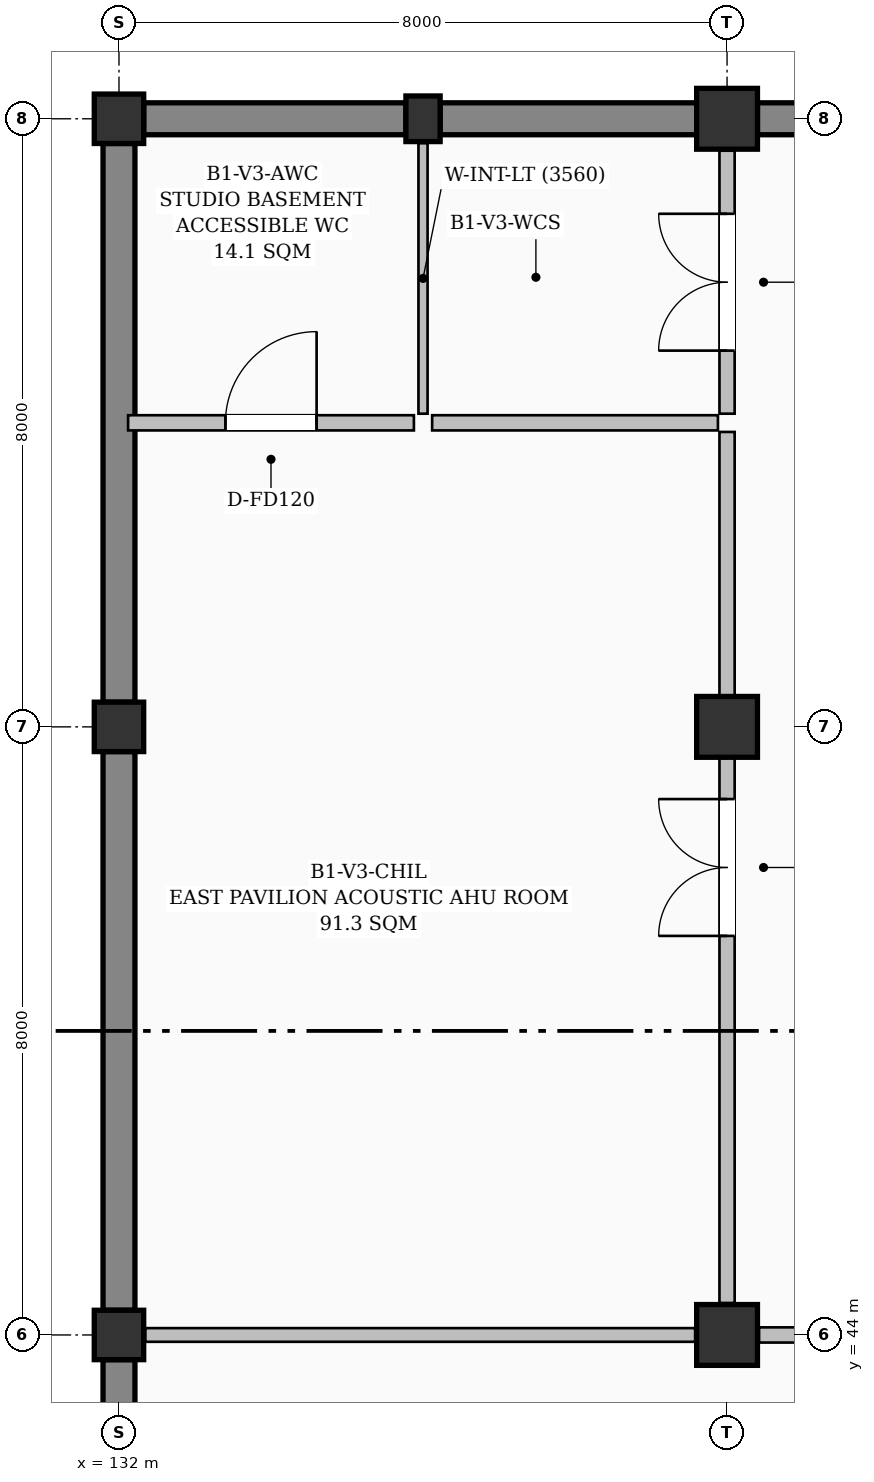
"""IFC4 building model, lengths in metres.
Left out: names, types, materials, properties, quantities, classifications, styles, units other than length and angle.
Written with IfcOpenShell. Run it as: python <this file> out.ifc"""

import sys

from ifc_helpers import new_model, si_unit, direction, frame, frame_2d, origin, origin_2d, place, context, subcontext, project, spatial, rectangle, extrude, element, fill, save


model = new_model("IFC4")
c1 = context("Model", 3, precision=1e-05, world=origin(), true_north=direction((0.0, 1.0)))
c2 = subcontext(c1, "Body", "Model", "MODEL_VIEW")
j1 = project(units=[si_unit("LENGTHUNIT", "METRE"), si_unit("PLANEANGLEUNIT", "RADIAN")], contexts=[c1])
p1 = place(None, origin())
s1 = spatial("IfcSite", under=j1, at=p1, CompositionType="ELEMENT")
p2 = place(p1, origin())
s2 = spatial("IfcBuilding", under=s1, at=p2, CompositionType="ELEMENT")
p3 = place(p2, frame((0.0, 0.0, -4.8)))
s3 = spatial("IfcBuildingStorey", under=s2, at=p3, CompositionType="ELEMENT", Elevation=-4.8)
for number, where, z_axis, x_axis in (
    (1, (132.0, 44.0, -0.38), (0.0, 0.0, 1.0), (1.0, 0.0, 0.0)),
    (2, (132.0, 52.0, -0.38), (0.0, 0.0, 1.0), (1.0, 0.0, 0.0)),
    (3, (132.0, 60.0, -0.38), (0.0, 0.0, 1.0), (1.0, 0.0, 0.0)),
):
    element("IfcColumn", number, at=place(p3, frame(where, z_axis=z_axis, x_axis=x_axis)), inside=s3, PredefinedType="COLUMN", context=c2, shape_type="SweptSolid", body=[
        extrude(rectangle(XDim=0.65, YDim=0.65, at=origin_2d()), origin(), (0.0, 0.0, 1.0), 5.18),
    ])
p4 = place(p3, frame((136.0, 60.0, -0.38), z_axis=(0.0, 0.0, 1.0), x_axis=(1.0, 0.0, 0.0)))
e4 = element("IfcColumn", 4, at=p4, inside=s3, PredefinedType="PILASTER", context=c2, shape_type="SweptSolid", body=[
    extrude(rectangle(XDim=0.45, YDim=0.6, at=origin_2d()), origin(), (0.0, 0.0, 1.0), 5.18),
])
for number, where, z_axis, x_axis in (
    (5, (140.0, 44.0, -0.38), (0.0, 0.0, 1.0), (1.0, 0.0, 0.0)),
    (6, (140.0, 52.0, -0.38), (0.0, 0.0, 1.0), (1.0, 0.0, 0.0)),
    (7, (140.0, 60.0, -0.38), (0.0, 0.0, 1.0), (1.0, 0.0, 0.0)),
):
    element("IfcColumn", number, at=place(p3, frame(where, z_axis=z_axis, x_axis=x_axis)), inside=s3, PredefinedType="COLUMN", context=c2, shape_type="SweptSolid", body=[
        extrude(rectangle(XDim=0.8, YDim=0.8, at=origin_2d()), origin(), (0.0, 0.0, 1.0), 5.18),
    ])
for number, where, z_axis, x_axis in (
    (8, (132.0, 36.325, 0.0), (0.0, 0.0, 1.0), (0.0, 1.0, 0.0)),
    (9, (132.0, 44.325, 0.0), (0.0, 0.0, 1.0), (0.0, 1.0, 0.0)),
    (10, (132.0, 52.325, 0.0), (0.0, 0.0, 1.0), (0.0, 1.0, 0.0)),
):
    element("IfcWall", number, at=place(p3, frame(where, z_axis=z_axis, x_axis=x_axis)), inside=s3, PredefinedType="USERDEFINED", context=c2, shape_type="SweptSolid", body=[
        extrude(rectangle(XDim=7.35, YDim=0.42, at=frame_2d((3.675, 0.0))), origin(), (0.0, 0.0, 1.0), 3.85),
    ])
p5 = place(p3, frame((132.325, 60.0, 0.0), z_axis=(0.0, 0.0, 1.0), x_axis=(1.0, 0.0, 0.0)))
e11 = element("IfcWall", 11, at=p5, inside=s3, PredefinedType="USERDEFINED", context=c2, shape_type="SweptSolid", body=[
    extrude(rectangle(XDim=3.45, YDim=0.42, at=frame_2d((1.725, 0.0))), origin(), (0.0, 0.0, 1.0), 3.85),
])
p6 = place(p3, frame((136.225, 60.0, 0.0), z_axis=(0.0, 0.0, 1.0), x_axis=(1.0, 0.0, 0.0)))
e12 = element("IfcWall", 12, at=p6, inside=s3, PredefinedType="USERDEFINED", context=c2, shape_type="SweptSolid", body=[
    extrude(rectangle(XDim=3.375, YDim=0.42, at=frame_2d((1.688, 0.0))), origin(), (0.0, 0.0, 1.0), 3.85),
])
p7 = place(p3, frame((140.4, 60.0, 0.0), z_axis=(0.0, 0.0, 1.0), x_axis=(1.0, 0.0, 0.0)))
e13 = element("IfcWall", 13, at=p7, inside=s3, PredefinedType="USERDEFINED", context=c2, shape_type="SweptSolid", body=[
    extrude(rectangle(XDim=3.4, YDim=0.42, at=frame_2d((1.7, 0.0))), origin(), (0.0, 0.0, 1.0), 3.85),
])
p8 = place(p3, frame((140.42, 44.0, 0.0), z_axis=(0.0, 0.0, 1.0), x_axis=(1.0, 0.0, 0.0)))
e14 = element("IfcWall", 14, at=p8, inside=s3, PredefinedType="PARTITIONING", context=c2, shape_type="SweptSolid", body=[
    extrude(rectangle(XDim=11.46, YDim=0.2, at=frame_2d((5.73, 0.0))), origin(), (0.0, 0.0, 1.0), 3.635),
])
p9 = place(p8, frame((4.83, 0.0, 0.0)))
e15 = element("IfcOpeningElement", 15, at=p9, cuts=e14, PredefinedType="OPENING", context=c2, shape_type="SweptSolid", body=[
    extrude(rectangle(XDim=1.8, YDim=2.35, at=frame_2d((0.9, 1.175))), frame((0.0, 0.11, 0.0), z_axis=(0.0, -1.0, 0.0), x_axis=(1.0, 0.0, 0.0)), (0.0, 0.0, 1.0), 0.22),
])
p10 = place(p3, frame((140.0, 44.42, 0.0), z_axis=(0.0, 0.0, 1.0), x_axis=(0.0, 1.0, 0.0)))
e16 = element("IfcWall", 16, at=p10, inside=s3, PredefinedType="PARTITIONING", context=c2, shape_type="SweptSolid", body=[
    extrude(rectangle(XDim=11.46, YDim=0.2, at=frame_2d((5.73, 0.0))), origin(), (0.0, 0.0, 1.0), 3.885),
])
p11 = place(p10, frame((4.83, 0.0, 0.0)))
e17 = element("IfcOpeningElement", 17, at=p11, cuts=e16, PredefinedType="OPENING", context=c2, shape_type="SweptSolid", body=[
    extrude(rectangle(XDim=1.8, YDim=2.35, at=frame_2d((0.9, 1.175))), frame((0.0, 0.11, 0.0), z_axis=(0.0, -1.0, 0.0), x_axis=(1.0, 0.0, 0.0)), (0.0, 0.0, 1.0), 0.22),
])
p12 = place(p3, frame((140.0, 56.12, 0.0), z_axis=(0.0, 0.0, 1.0), x_axis=(0.0, 1.0, 0.0)))
e18 = element("IfcWall", 18, at=p12, inside=s3, PredefinedType="PARTITIONING", context=c2, shape_type="SweptSolid", body=[
    extrude(rectangle(XDim=3.46, YDim=0.2, at=frame_2d((1.73, 0.0))), origin(), (0.0, 0.0, 1.0), 3.885),
])
p13 = place(p12, frame((0.83, 0.0, 0.0)))
e19 = element("IfcOpeningElement", 19, at=p13, cuts=e18, PredefinedType="OPENING", context=c2, shape_type="SweptSolid", body=[
    extrude(rectangle(XDim=1.8, YDim=2.35, at=frame_2d((0.9, 1.175))), frame((0.0, 0.11, 0.0), z_axis=(0.0, -1.0, 0.0), x_axis=(1.0, 0.0, 0.0)), (0.0, 0.0, 1.0), 0.22),
])
p14 = place(p3, frame((132.345, 44.0, 0.0), z_axis=(0.0, 0.0, 1.0), x_axis=(1.0, 0.0, 0.0)))
e20 = element("IfcWall", 20, at=p14, inside=s3, PredefinedType="PARTITIONING", context=c2, shape_type="SweptSolid", body=[
    extrude(rectangle(XDim=7.235, YDim=0.18, at=frame_2d((3.618, 0.0))), origin(), (0.0, 0.0, 1.0), 3.735),
])
p15 = place(p3, frame((132.12, 56.0, 0.0), z_axis=(0.0, 0.0, 1.0), x_axis=(1.0, 0.0, 0.0)))
e21 = element("IfcWall", 21, at=p15, inside=s3, PredefinedType="PARTITIONING", context=c2, shape_type="SweptSolid", body=[
    extrude(rectangle(XDim=3.76, YDim=0.2, at=frame_2d((1.88, 0.0))), origin(), (0.0, 0.0, 1.0), 4.5),
])
p16 = place(p15, frame((1.28, 0.0, 0.0)))
e22 = element("IfcOpeningElement", 22, at=p16, cuts=e21, PredefinedType="OPENING", context=c2, shape_type="SweptSolid", body=[
    extrude(rectangle(XDim=1.2, YDim=2.2, at=frame_2d((0.6, 1.1))), frame((0.0, 0.11, 0.0), z_axis=(0.0, -1.0, 0.0), x_axis=(1.0, 0.0, 0.0)), (0.0, 0.0, 1.0), 0.22),
])
p17 = place(p3, frame((136.12, 56.0, 0.0), z_axis=(0.0, 0.0, 1.0), x_axis=(1.0, 0.0, 0.0)))
e23 = element("IfcWall", 23, at=p17, inside=s3, PredefinedType="PARTITIONING", context=c2, shape_type="SweptSolid", body=[
    extrude(rectangle(XDim=3.76, YDim=0.2, at=frame_2d((1.88, 0.0))), origin(), (0.0, 0.0, 1.0), 4.5),
])
p18 = place(p3, frame((136.0, 56.12, 0.0), z_axis=(0.0, 0.0, 1.0), x_axis=(0.0, 1.0, 0.0)))
e24 = element("IfcWall", 24, at=p18, inside=s3, PredefinedType="PARTITIONING", context=c2, shape_type="SweptSolid", body=[
    extrude(rectangle(XDim=3.56, YDim=0.12, at=frame_2d((1.78, 0.0))), origin(), (0.0, 0.0, 1.0), 4.5),
])
p19 = place(p11, origin())
e25 = element("IfcDoor", 25, at=p19, inside=s3, OperationType="DOUBLE_DOOR_SINGLE_SWING", PredefinedType="DOOR", context=c2, shape_type="SweptSolid", body=[
    extrude(rectangle(XDim=1.8, YDim=2.35, at=frame_2d((0.9, 1.175))), frame((0.0, 0.025, 0.0), z_axis=(0.0, -1.0, 0.0), x_axis=(1.0, 0.0, 0.0)), (0.0, 0.0, 1.0), 0.05),
])
fill(e17, e25)
p20 = place(p13, origin())
e26 = element("IfcDoor", 26, at=p20, inside=s3, OperationType="DOUBLE_DOOR_SINGLE_SWING", PredefinedType="DOOR", context=c2, shape_type="SweptSolid", body=[
    extrude(rectangle(XDim=1.8, YDim=2.35, at=frame_2d((0.9, 1.175))), frame((0.0, 0.025, 0.0), z_axis=(0.0, -1.0, 0.0), x_axis=(1.0, 0.0, 0.0)), (0.0, 0.0, 1.0), 0.05),
])
fill(e19, e26)
p21 = place(p16, origin())
e27 = element("IfcDoor", 27, at=p21, inside=s3, OperationType="SINGLE_SWING_RIGHT", PredefinedType="DOOR", context=c2, shape_type="SweptSolid", body=[
    extrude(rectangle(XDim=1.2, YDim=2.2, at=frame_2d((0.6, 1.1))), frame((0.0, 0.025, 0.0), z_axis=(0.0, -1.0, 0.0), x_axis=(1.0, 0.0, 0.0)), (0.0, 0.0, 1.0), 0.05),
])
fill(e22, e27)
save(model, sys.argv[1])
